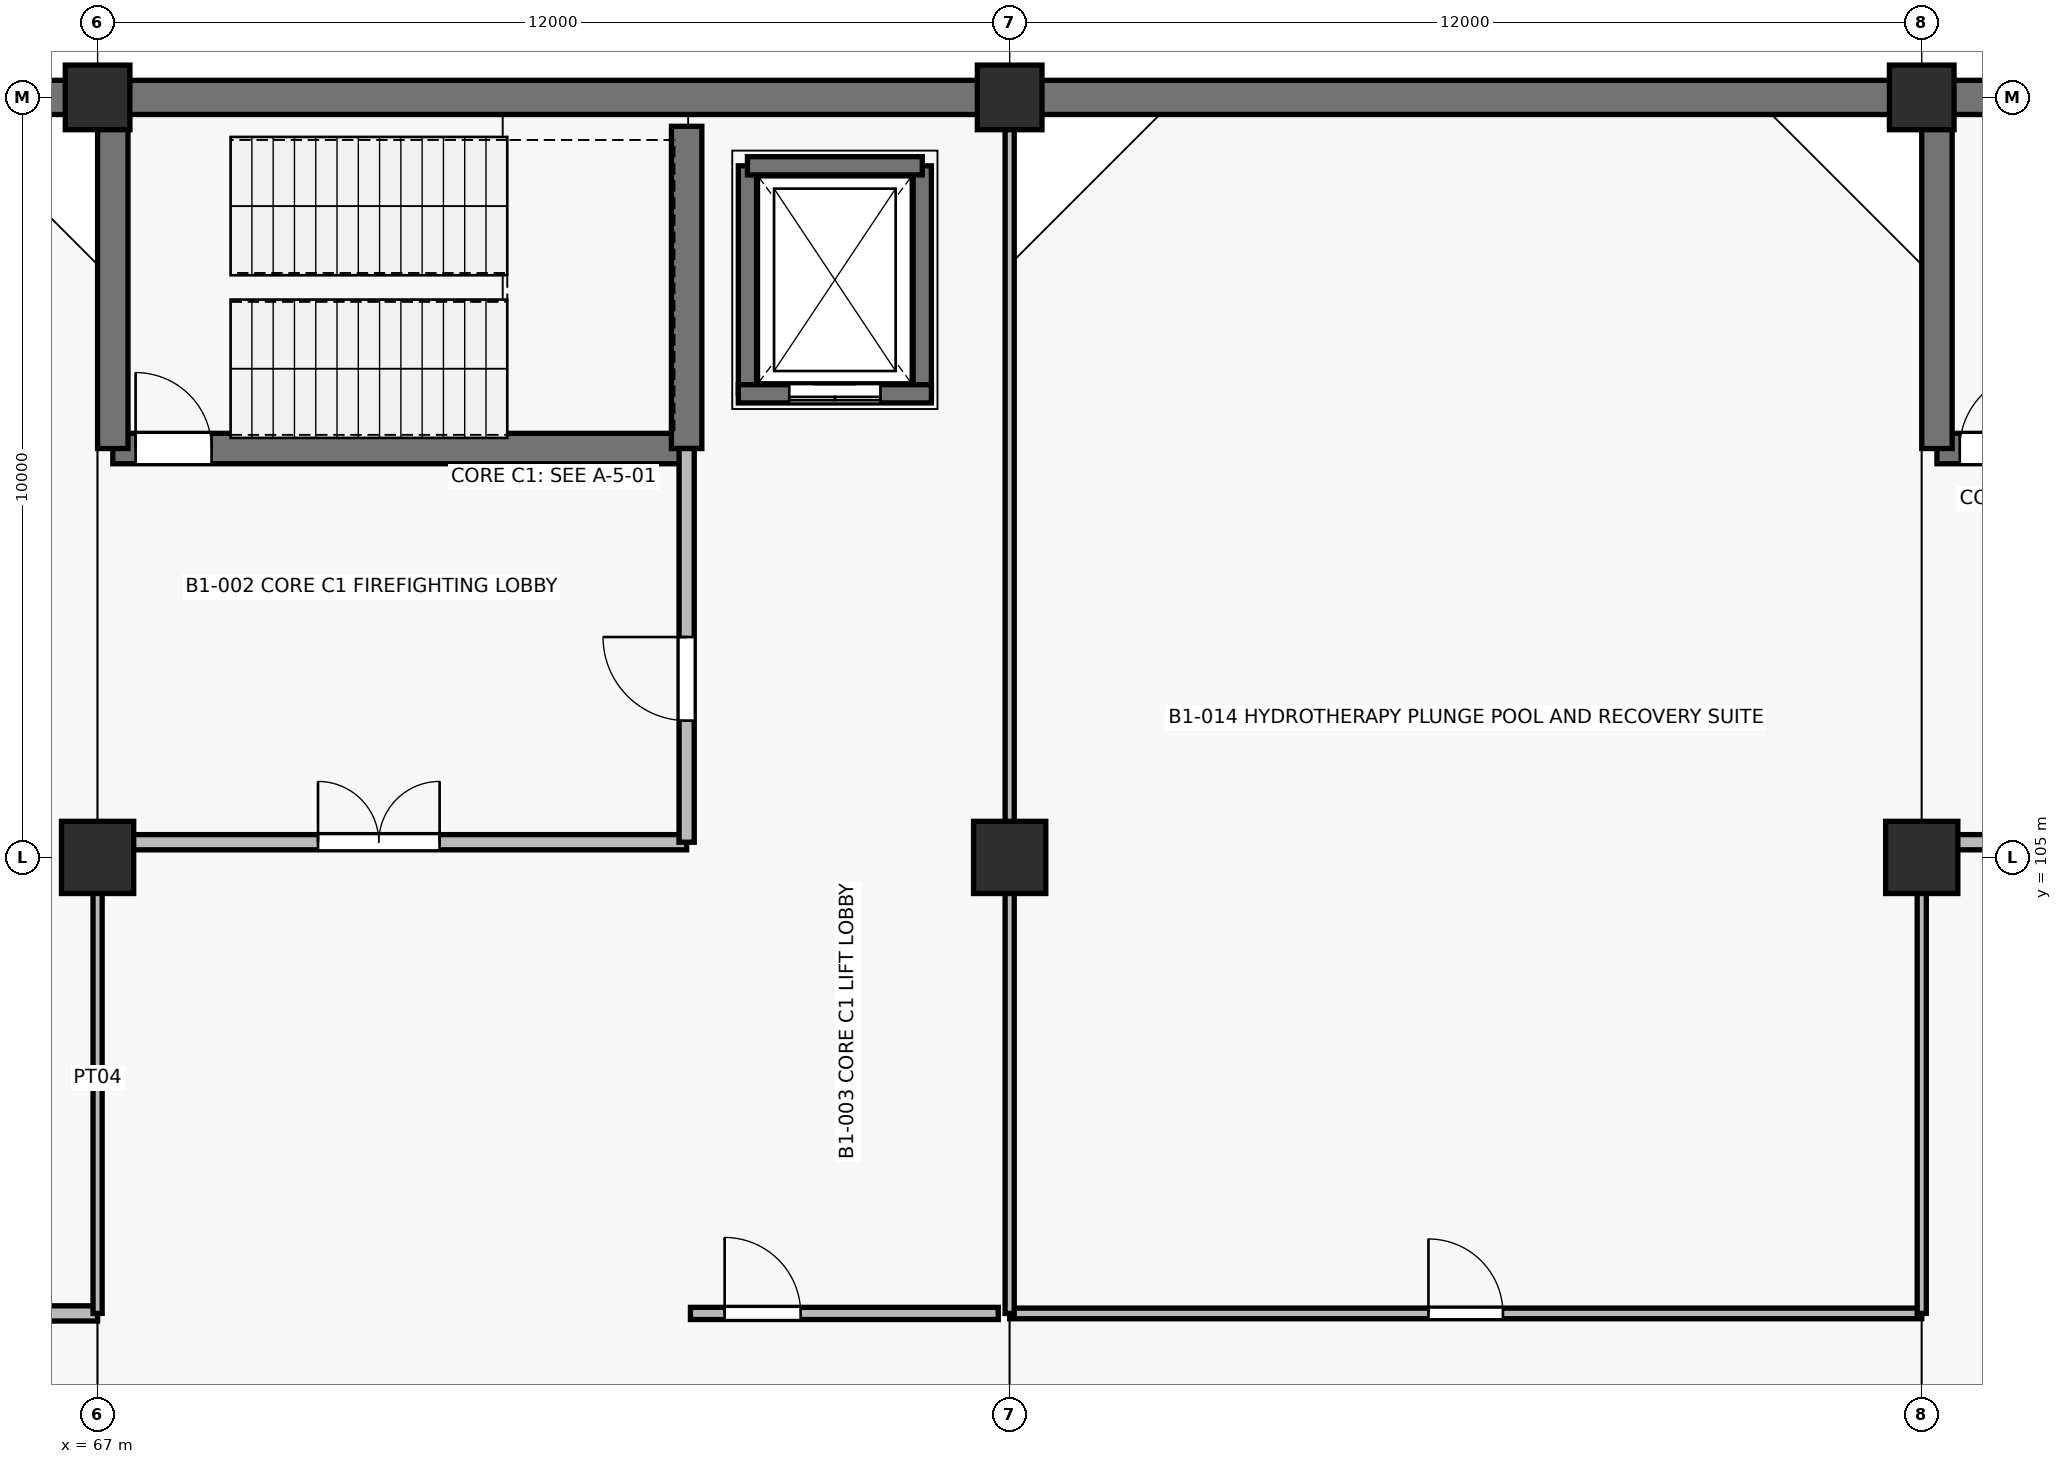
"""IFC4 building model, lengths in metres.
Left out: names, types, materials, properties, quantities, classifications, styles, units other than length and angle.
Written with IfcOpenShell. Run it as: python <this file> out.ifc"""

import sys

from ifc_helpers import new_model, si_unit, direction, frame, frame_2d, origin, origin_2d, place, context, subcontext, project, spatial, rectangle, extrude, element, fill, save


model = new_model("IFC4")
c1 = context("Model", 3, precision=1e-05, world=origin(), true_north=direction((0.0, 1.0)))
c2 = subcontext(c1, "Body", "Model", "MODEL_VIEW")
j1 = project(units=[si_unit("LENGTHUNIT", "METRE"), si_unit("PLANEANGLEUNIT", "RADIAN")], contexts=[c1])
p1 = place(None, origin())
s1 = spatial("IfcSite", under=j1, at=p1, CompositionType="ELEMENT")
p2 = place(p1, origin())
s2 = spatial("IfcBuilding", under=s1, at=p2, CompositionType="ELEMENT")
p3 = place(p2, frame((0.0, 0.0, -4.5)))
s3 = spatial("IfcBuildingStorey", under=s2, at=p3, CompositionType="ELEMENT", Elevation=-4.5)
p4 = place(p3, frame((67.0, 105.0, 0.0), z_axis=(0.0, 0.0, 1.0), x_axis=(1.0, 0.0, 0.0)))
e1 = element("IfcColumn", 1, at=p4, inside=s3, PredefinedType="COLUMN", context=c2, shape_type="SweptSolid", body=[
    extrude(rectangle(XDim=0.95, YDim=0.95, at=origin_2d()), origin(), (0.0, 0.0, 1.0), 4.5),
])
p5 = place(p3, frame((67.0, 115.0, 0.0), z_axis=(0.0, 0.0, 1.0), x_axis=(1.0, 0.0, 0.0)))
e2 = element("IfcColumn", 2, at=p5, inside=s3, PredefinedType="COLUMN", context=c2, shape_type="SweptSolid", body=[
    extrude(rectangle(XDim=0.85, YDim=0.85, at=origin_2d()), origin(), (0.0, 0.0, 1.0), 4.5),
])
p6 = place(p3, frame((79.0, 105.0, 0.0), z_axis=(0.0, 0.0, 1.0), x_axis=(1.0, 0.0, 0.0)))
e3 = element("IfcColumn", 3, at=p6, inside=s3, PredefinedType="COLUMN", context=c2, shape_type="SweptSolid", body=[
    extrude(rectangle(XDim=0.95, YDim=0.95, at=origin_2d()), origin(), (0.0, 0.0, 1.0), 4.5),
])
p7 = place(p3, frame((79.0, 115.0, 0.0), z_axis=(0.0, 0.0, 1.0), x_axis=(1.0, 0.0, 0.0)))
e4 = element("IfcColumn", 4, at=p7, inside=s3, PredefinedType="COLUMN", context=c2, shape_type="SweptSolid", body=[
    extrude(rectangle(XDim=0.85, YDim=0.85, at=origin_2d()), origin(), (0.0, 0.0, 1.0), 4.5),
])
p8 = place(p3, frame((91.0, 105.0, 0.0), z_axis=(0.0, 0.0, 1.0), x_axis=(1.0, 0.0, 0.0)))
e5 = element("IfcColumn", 5, at=p8, inside=s3, PredefinedType="COLUMN", context=c2, shape_type="SweptSolid", body=[
    extrude(rectangle(XDim=0.95, YDim=0.95, at=origin_2d()), origin(), (0.0, 0.0, 1.0), 4.5),
])
p9 = place(p3, frame((91.0, 115.0, 0.0), z_axis=(0.0, 0.0, 1.0), x_axis=(1.0, 0.0, 0.0)))
e6 = element("IfcColumn", 6, at=p9, inside=s3, PredefinedType="COLUMN", context=c2, shape_type="SweptSolid", body=[
    extrude(rectangle(XDim=0.85, YDim=0.85, at=origin_2d()), origin(), (0.0, 0.0, 1.0), 4.5),
])
p10 = place(p3, frame((43.0, 115.0, 0.0), z_axis=(0.0, 0.0, 1.0), x_axis=(1.0, 0.0, 0.0)))
e7 = element("IfcWall", 7, at=p10, inside=s3, PredefinedType="SOLIDWALL", context=c2, shape_type="SweptSolid", body=[
    extrude(rectangle(XDim=118.0, YDim=0.45, at=frame_2d((59.0, 0.0))), origin(), (0.0, 0.0, 1.0), 4.5),
])
p11 = place(p3, frame((75.55, 111.1, -1.3), z_axis=(0.0, 0.0, 1.0), x_axis=(0.0, 1.0, 0.0)))
e8 = element("IfcWall", 8, at=p11, inside=s3, PredefinedType="SHEAR", context=c2, shape_type="SweptSolid", body=[
    extrude(rectangle(XDim=3.0, YDim=0.24, at=frame_2d((1.5, 0.0))), origin(), (0.0, 0.0, 1.0), 5.8),
])
p12 = place(p3, frame((77.85, 114.1, 0.0), z_axis=(0.0, 0.0, 1.0), x_axis=(0.0, -1.0, 0.0)))
e9 = element("IfcWall", 9, at=p12, inside=s3, PredefinedType="SHEAR", context=c2, shape_type="SweptSolid", body=[
    extrude(rectangle(XDim=3.0, YDim=0.24, at=frame_2d((1.5, 0.0))), origin(), (0.0, 0.0, 1.0), 4.5),
])
p13 = place(p3, frame((75.55, 114.1, 0.0), z_axis=(0.0, 0.0, 1.0), x_axis=(1.0, 0.0, 0.0)))
e10 = element("IfcWall", 10, at=p13, inside=s3, PredefinedType="SHEAR", context=c2, shape_type="SweptSolid", body=[
    extrude(rectangle(XDim=2.3, YDim=0.24, at=frame_2d((1.15, 0.0))), origin(), (0.0, 0.0, 1.0), 4.5),
])
p14 = place(p3, frame((77.97, 111.1, 0.0), z_axis=(0.0, 0.0, 1.0), x_axis=(-1.0, 0.0, 0.0)))
e11 = element("IfcWall", 11, at=p14, inside=s3, PredefinedType="SHEAR", context=c2, shape_type="SweptSolid", body=[
    extrude(rectangle(XDim=2.54, YDim=0.24, at=frame_2d((1.27, 0.0))), origin(), (0.0, 0.0, 1.0), 4.5),
])
p15 = place(p14, frame((0.67, 0.0, 0.0)))
e12 = element("IfcOpeningElement", 12, at=p15, cuts=e11, PredefinedType="OPENING", context=c2, shape_type="SweptSolid", body=[
    extrude(rectangle(XDim=1.2, YDim=2.15, at=frame_2d((0.6, 1.075))), frame((0.0, 0.13, 0.0), z_axis=(0.0, -1.0, 0.0), x_axis=(1.0, 0.0, 0.0)), (0.0, 0.0, 1.0), 0.26),
])
p16 = place(p3, frame((67.2, 110.38, 0.0), z_axis=(0.0, 0.0, 1.0), x_axis=(1.0, 0.0, 0.0)))
e13 = element("IfcWall", 13, at=p16, inside=s3, PredefinedType="SHEAR", context=c2, shape_type="SweptSolid", body=[
    extrude(rectangle(XDim=7.55, YDim=0.4, at=frame_2d((3.775, 0.0))), origin(), (0.0, 0.0, 1.0), 4.5),
])
p17 = place(p16, frame((0.3, 0.0, 0.0)))
e14 = element("IfcOpeningElement", 14, at=p17, cuts=e13, PredefinedType="OPENING", context=c2, shape_type="SweptSolid", body=[
    extrude(rectangle(XDim=1.0, YDim=2.15, at=frame_2d((0.5, 1.075))), frame((0.0, 0.21, 0.0), z_axis=(0.0, -1.0, 0.0), x_axis=(1.0, 0.0, 0.0)), (0.0, 0.0, 1.0), 0.42),
])
for number, where, z_axis, x_axis in (
    (15, (74.75, 110.38, 0.0), (0.0, 0.0, 1.0), (0.0, 1.0, 0.0)),
    (16, (67.2, 114.62, 0.0), (0.0, 0.0, 1.0), (0.0, -1.0, 0.0)),
):
    element("IfcWall", number, at=place(p3, frame(where, z_axis=z_axis, x_axis=x_axis)), inside=s3, PredefinedType="SHEAR", context=c2, shape_type="SweptSolid", body=[
        extrude(rectangle(XDim=4.24, YDim=0.4, at=frame_2d((2.12, 0.0))), origin(), (0.0, 0.0, 1.0), 4.5),
    ])
p18 = place(p3, frame((67.2, 105.2, 0.0), z_axis=(0.0, 0.0, 1.0), x_axis=(1.0, 0.0, 0.0)))
e17 = element("IfcWall", 17, at=p18, inside=s3, PredefinedType="PARTITIONING", context=c2, shape_type="SweptSolid", body=[
    extrude(rectangle(XDim=7.55, YDim=0.2, at=frame_2d((3.775, 0.0))), origin(), (0.0, 0.0, 1.0), 3.175),
])
p19 = place(p18, frame((2.7, 0.0, 0.0)))
e18 = element("IfcOpeningElement", 18, at=p19, cuts=e17, PredefinedType="OPENING", context=c2, shape_type="SweptSolid", body=[
    extrude(rectangle(XDim=1.6, YDim=2.2, at=frame_2d((0.8, 1.1))), frame((0.0, 0.11, 0.0), z_axis=(0.0, -1.0, 0.0), x_axis=(1.0, 0.0, 0.0)), (0.0, 0.0, 1.0), 0.22),
])
p20 = place(p3, frame((74.75, 105.2, 0.0), z_axis=(0.0, 0.0, 1.0), x_axis=(0.0, 1.0, 0.0)))
e19 = element("IfcWall", 19, at=p20, inside=s3, PredefinedType="PARTITIONING", context=c2, shape_type="SweptSolid", body=[
    extrude(rectangle(XDim=5.18, YDim=0.2, at=frame_2d((2.59, 0.0))), origin(), (0.0, 0.0, 1.0), 3.175),
])
p21 = place(p20, frame((1.6, 0.0, 0.0)))
e20 = element("IfcOpeningElement", 20, at=p21, cuts=e19, PredefinedType="OPENING", context=c2, shape_type="SweptSolid", body=[
    extrude(rectangle(XDim=1.1, YDim=2.15, at=frame_2d((0.55, 1.075))), frame((0.0, 0.11, 0.0), z_axis=(0.0, -1.0, 0.0), x_axis=(1.0, 0.0, 0.0)), (0.0, 0.0, 1.0), 0.22),
])
p22 = place(p3, frame((74.8, 99.0, 0.0), z_axis=(0.0, 0.0, 1.0), x_axis=(1.0, 0.0, 0.0)))
e21 = element("IfcWall", 21, at=p22, inside=s3, PredefinedType="PARTITIONING", context=c2, shape_type="SweptSolid", body=[
    extrude(rectangle(XDim=4.05, YDim=0.16, at=frame_2d((2.025, 0.0))), origin(), (0.0, 0.0, 1.0), 3.275),
])
p23 = place(p22, frame((0.45, 0.0, 0.0)))
e22 = element("IfcOpeningElement", 22, at=p23, cuts=e21, PredefinedType="OPENING", context=c2, shape_type="SweptSolid", body=[
    extrude(rectangle(XDim=1.0, YDim=2.15, at=frame_2d((0.5, 1.075))), frame((0.0, 0.09, 0.0), z_axis=(0.0, -1.0, 0.0), x_axis=(1.0, 0.0, 0.0)), (0.0, 0.0, 1.0), 0.18),
])
p24 = place(p3, frame((91.2, 110.38, 0.0), z_axis=(0.0, 0.0, 1.0), x_axis=(1.0, 0.0, 0.0)))
e23 = element("IfcWall", 23, at=p24, inside=s3, PredefinedType="SHEAR", context=c2, shape_type="SweptSolid", body=[
    extrude(rectangle(XDim=7.1, YDim=0.4, at=frame_2d((3.55, 0.0))), origin(), (0.0, 0.0, 1.0), 4.5),
])
p25 = place(p24, frame((0.3, 0.0, 0.0)))
e24 = element("IfcOpeningElement", 24, at=p25, cuts=e23, PredefinedType="OPENING", context=c2, shape_type="SweptSolid", body=[
    extrude(rectangle(XDim=1.0, YDim=2.15, at=frame_2d((0.5, 1.075))), frame((0.0, 0.21, 0.0), z_axis=(0.0, -1.0, 0.0), x_axis=(1.0, 0.0, 0.0)), (0.0, 0.0, 1.0), 0.42),
])
p26 = place(p3, frame((91.2, 114.62, 0.0), z_axis=(0.0, 0.0, 1.0), x_axis=(0.0, -1.0, 0.0)))
e25 = element("IfcWall", 25, at=p26, inside=s3, PredefinedType="SHEAR", context=c2, shape_type="SweptSolid", body=[
    extrude(rectangle(XDim=4.24, YDim=0.4, at=frame_2d((2.12, 0.0))), origin(), (0.0, 0.0, 1.0), 4.5),
])
p27 = place(p3, frame((91.2, 105.2, 0.0), z_axis=(0.0, 0.0, 1.0), x_axis=(1.0, 0.0, 0.0)))
e26 = element("IfcWall", 26, at=p27, inside=s3, PredefinedType="PARTITIONING", context=c2, shape_type="SweptSolid", body=[
    extrude(rectangle(XDim=7.1, YDim=0.2, at=frame_2d((3.55, 0.0))), origin(), (0.0, 0.0, 1.0), 3.175),
])
p28 = place(p27, frame((2.7, 0.0, 0.0)))
e27 = element("IfcOpeningElement", 27, at=p28, cuts=e26, PredefinedType="OPENING", context=c2, shape_type="SweptSolid", body=[
    extrude(rectangle(XDim=1.6, YDim=2.2, at=frame_2d((0.8, 1.1))), frame((0.0, 0.11, 0.0), z_axis=(0.0, -1.0, 0.0), x_axis=(1.0, 0.0, 0.0)), (0.0, 0.0, 1.0), 0.22),
])
p29 = place(p3, frame((43.18, 99.0, 0.0), z_axis=(0.0, 0.0, 1.0), x_axis=(1.0, 0.0, 0.0)))
e28 = element("IfcWall", 28, at=p29, inside=s3, PredefinedType="PARTITIONING", context=c2, shape_type="SweptSolid", body=[
    extrude(rectangle(XDim=23.82, YDim=0.2, at=frame_2d((11.91, 0.0))), origin(), (0.0, 0.0, 1.0), 3.275),
])
p30 = place(p29, frame((11.36, 0.0, 0.0)))
e29 = element("IfcOpeningElement", 29, at=p30, cuts=e28, PredefinedType="OPENING", context=c2, shape_type="SweptSolid", body=[
    extrude(rectangle(XDim=1.1, YDim=2.15, at=frame_2d((0.55, 1.075))), frame((0.0, 0.11, 0.0), z_axis=(0.0, -1.0, 0.0), x_axis=(1.0, 0.0, 0.0)), (0.0, 0.0, 1.0), 0.22),
])
p31 = place(p3, frame((67.0, 99.0, 0.0), z_axis=(0.0, 0.0, 1.0), x_axis=(0.0, 1.0, 0.0)))
e30 = element("IfcWall", 30, at=p31, inside=s3, PredefinedType="PARTITIONING", context=c2, shape_type="SweptSolid", body=[
    extrude(rectangle(XDim=6.2, YDim=0.12, at=frame_2d((3.1, 0.0))), origin(), (0.0, 0.0, 1.0), 3.175),
])
p32 = place(p3, frame((79.0, 99.0, 0.0), z_axis=(0.0, 0.0, 1.0), x_axis=(1.0, 0.0, 0.0)))
e31 = element("IfcWall", 31, at=p32, inside=s3, PredefinedType="PARTITIONING", context=c2, shape_type="SweptSolid", body=[
    extrude(rectangle(XDim=12.0, YDim=0.14, at=frame_2d((6.0, 0.0))), origin(), (0.0, 0.0, 1.0), 3.275),
])
p33 = place(p32, frame((5.51, 0.0, 0.0)))
e32 = element("IfcOpeningElement", 32, at=p33, cuts=e31, PredefinedType="OPENING", context=c2, shape_type="SweptSolid", body=[
    extrude(rectangle(XDim=0.98, YDim=2.1, at=frame_2d((0.49, 1.05))), frame((0.0, 0.08, 0.0), z_axis=(0.0, -1.0, 0.0), x_axis=(1.0, 0.0, 0.0)), (0.0, 0.0, 1.0), 0.16),
])
p34 = place(p3, frame((79.0, 99.0, 0.0), z_axis=(0.0, 0.0, 1.0), x_axis=(0.0, 1.0, 0.0)))
e33 = element("IfcWall", 33, at=p34, inside=s3, PredefinedType="PARTITIONING", context=c2, shape_type="SweptSolid", body=[
    extrude(rectangle(XDim=15.75, YDim=0.12, at=frame_2d((7.875, 0.0))), origin(), (0.0, 0.0, 1.0), 3.175),
])
p35 = place(p3, frame((91.0, 99.0, 0.0), z_axis=(0.0, 0.0, 1.0), x_axis=(0.0, 1.0, 0.0)))
e34 = element("IfcWall", 34, at=p35, inside=s3, PredefinedType="PARTITIONING", context=c2, shape_type="SweptSolid", body=[
    extrude(rectangle(XDim=6.2, YDim=0.12, at=frame_2d((3.1, 0.0))), origin(), (0.0, 0.0, 1.0), 3.175),
])
p36 = place(p15, origin())
e35 = element("IfcDoor", 35, at=p36, inside=s3, OperationType="DOUBLE_DOOR_SLIDING", PredefinedType="USERDEFINED", context=c2, shape_type="SweptSolid", body=[
    extrude(rectangle(XDim=1.2, YDim=2.15, at=frame_2d((0.6, 1.075))), frame((0.0, 0.025, 0.0), z_axis=(0.0, -1.0, 0.0), x_axis=(1.0, 0.0, 0.0)), (0.0, 0.0, 1.0), 0.05),
])
fill(e12, e35)
p37 = place(p17, origin())
e36 = element("IfcDoor", 36, at=p37, inside=s3, OperationType="SINGLE_SWING_LEFT", PredefinedType="DOOR", context=c2, shape_type="SweptSolid", body=[
    extrude(rectangle(XDim=1.0, YDim=2.15, at=frame_2d((0.5, 1.075))), frame((0.0, 0.025, 0.0), z_axis=(0.0, -1.0, 0.0), x_axis=(1.0, 0.0, 0.0)), (0.0, 0.0, 1.0), 0.05),
])
fill(e14, e36)
p38 = place(p19, origin())
e37 = element("IfcDoor", 37, at=p38, inside=s3, OperationType="DOUBLE_DOOR_SINGLE_SWING", PredefinedType="DOOR", context=c2, shape_type="SweptSolid", body=[
    extrude(rectangle(XDim=1.6, YDim=2.2, at=frame_2d((0.8, 1.1))), frame((0.0, 0.025, 0.0), z_axis=(0.0, -1.0, 0.0), x_axis=(1.0, 0.0, 0.0)), (0.0, 0.0, 1.0), 0.05),
])
fill(e18, e37)
p39 = place(p21, origin())
e38 = element("IfcDoor", 38, at=p39, inside=s3, OperationType="SINGLE_SWING_RIGHT", PredefinedType="DOOR", context=c2, shape_type="SweptSolid", body=[
    extrude(rectangle(XDim=1.1, YDim=2.15, at=frame_2d((0.55, 1.075))), frame((0.0, 0.025, 0.0), z_axis=(0.0, -1.0, 0.0), x_axis=(1.0, 0.0, 0.0)), (0.0, 0.0, 1.0), 0.05),
])
fill(e20, e38)
p40 = place(p23, origin())
e39 = element("IfcDoor", 39, at=p40, inside=s3, OperationType="SINGLE_SWING_LEFT", PredefinedType="DOOR", context=c2, shape_type="SweptSolid", body=[
    extrude(rectangle(XDim=1.0, YDim=2.15, at=frame_2d((0.5, 1.075))), frame((0.0, 0.025, 0.0), z_axis=(0.0, -1.0, 0.0), x_axis=(1.0, 0.0, 0.0)), (0.0, 0.0, 1.0), 0.05),
])
fill(e22, e39)
p41 = place(p25, origin())
e40 = element("IfcDoor", 40, at=p41, inside=s3, OperationType="SINGLE_SWING_RIGHT", PredefinedType="DOOR", context=c2, shape_type="SweptSolid", body=[
    extrude(rectangle(XDim=1.0, YDim=2.15, at=frame_2d((0.5, 1.075))), frame((0.0, 0.025, 0.0), z_axis=(0.0, -1.0, 0.0), x_axis=(1.0, 0.0, 0.0)), (0.0, 0.0, 1.0), 0.05),
])
fill(e24, e40)
p42 = place(p33, origin())
e41 = element("IfcDoor", 41, at=p42, inside=s3, OperationType="SINGLE_SWING_LEFT", PredefinedType="DOOR", context=c2, shape_type="SweptSolid", body=[
    extrude(rectangle(XDim=0.98, YDim=2.1, at=frame_2d((0.49, 1.05))), frame((0.0, 0.025, 0.0), z_axis=(0.0, -1.0, 0.0), x_axis=(1.0, 0.0, 0.0)), (0.0, 0.0, 1.0), 0.05),
])
fill(e32, e41)
save(model, sys.argv[1])
